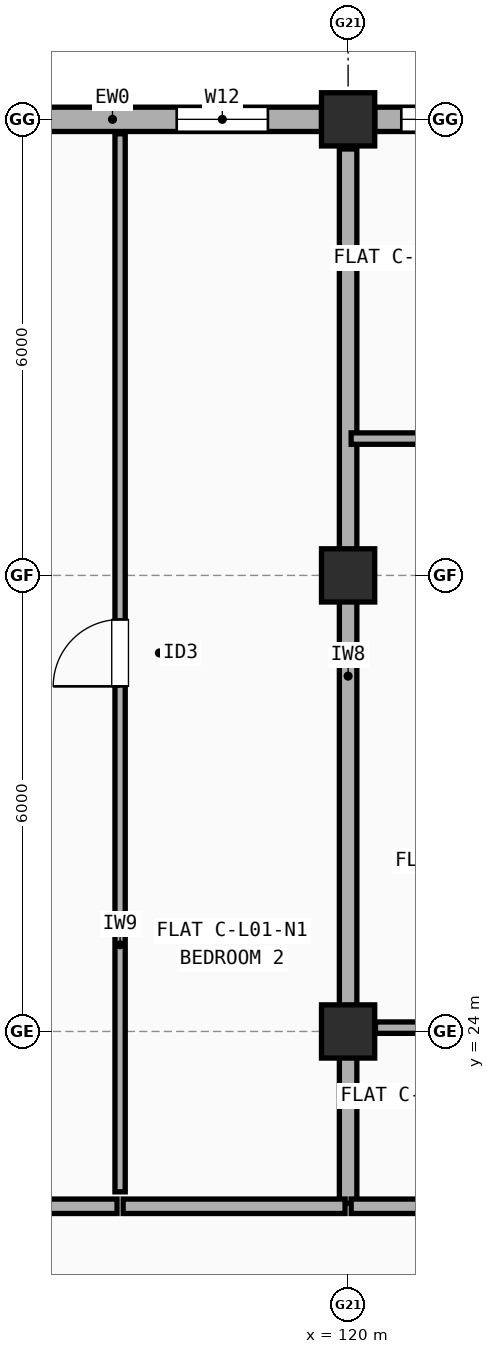
"""IFC4 building model, lengths in metres.
Left out: names, types, materials, properties, quantities, classifications, styles, units other than length and angle.
Written with IfcOpenShell. Run it as: python <this file> out.ifc"""

import sys

from ifc_helpers import new_model, si_unit, direction, frame, frame_2d, origin, origin_2d, place, context, subcontext, project, spatial, rectangle, extrude, element, fill, save


model = new_model("IFC4")
c1 = context("Model", 3, precision=1e-05, world=origin(), true_north=direction((0.0, 1.0)))
c2 = subcontext(c1, "Body", "Model", "MODEL_VIEW")
j1 = project(units=[si_unit("LENGTHUNIT", "METRE"), si_unit("PLANEANGLEUNIT", "RADIAN")], contexts=[c1])
p1 = place(None, origin())
s1 = spatial("IfcSite", under=j1, at=p1, CompositionType="ELEMENT")
p2 = place(p1, origin())
s2 = spatial("IfcBuilding", under=s1, at=p2, CompositionType="ELEMENT")
p3 = place(p2, frame((0.0, 0.0, 4.5)))
s3 = spatial("IfcBuildingStorey", under=s2, at=p3, CompositionType="ELEMENT", Elevation=4.5)
for number, where, z_axis, x_axis in (
    (1, (120.0, 24.0, 0.0), (0.0, 0.0, 1.0), (1.0, 0.0, 0.0)),
    (2, (120.0, 30.0, 0.0), (0.0, 0.0, 1.0), (1.0, 0.0, 0.0)),
    (3, (120.0, 36.0, 0.0), (0.0, 0.0, 1.0), (1.0, 0.0, 0.0)),
):
    element("IfcColumn", number, at=place(p3, frame(where, z_axis=z_axis, x_axis=x_axis)), inside=s3, PredefinedType="COLUMN", context=c2, shape_type="SweptSolid", body=[
        extrude(rectangle(XDim=0.7, YDim=0.7, at=origin_2d()), origin(), (0.0, 0.0, 1.0), 2.945),
    ])
p4 = place(p3, frame((125.65, 36.0, 0.0), z_axis=(0.0, 0.0, 1.0), x_axis=(-1.0, 0.0, 0.0)))
e4 = element("IfcWall", 4, at=p4, inside=s3, PredefinedType="STANDARD", context=c2, shape_type="SweptSolid", body=[
    extrude(rectangle(XDim=5.3, YDim=0.32, at=frame_2d((2.65, 0.0))), origin(), (0.0, 0.0, 1.0), 2.427),
])
p5 = place(p4, frame((1.54, 0.0, 0.9)))
e5 = element("IfcOpeningElement", 5, at=p5, cuts=e4, PredefinedType="OPENING", context=c2, shape_type="SweptSolid", body=[
    extrude(rectangle(XDim=0.95, YDim=1.35, at=frame_2d((0.475, 0.675))), frame((0.0, 0.17, 0.0), z_axis=(0.0, -1.0, 0.0), x_axis=(1.0, 0.0, 0.0)), (0.0, 0.0, 1.0), 0.34),
])
p6 = place(p4, frame((4.0, 0.0, 0.9)))
e6 = element("IfcOpeningElement", 6, at=p6, cuts=e4, PredefinedType="OPENING", context=c2, shape_type="SweptSolid", body=[
    extrude(rectangle(XDim=0.95, YDim=1.35, at=frame_2d((0.475, 0.675))), frame((0.0, 0.17, 0.0), z_axis=(0.0, -1.0, 0.0), x_axis=(1.0, 0.0, 0.0)), (0.0, 0.0, 1.0), 0.34),
])
p7 = place(p3, frame((119.65, 36.0, 0.0), z_axis=(0.0, 0.0, 1.0), x_axis=(-1.0, 0.0, 0.0)))
e7 = element("IfcWall", 7, at=p7, inside=s3, PredefinedType="STANDARD", context=c2, shape_type="SweptSolid", body=[
    extrude(rectangle(XDim=5.3, YDim=0.32, at=frame_2d((2.65, 0.0))), origin(), (0.0, 0.0, 1.0), 2.427),
])
p8 = place(p7, frame((0.705, 0.0, 0.9)))
e8 = element("IfcOpeningElement", 8, at=p8, cuts=e7, PredefinedType="OPENING", context=c2, shape_type="SweptSolid", body=[
    extrude(rectangle(XDim=1.2, YDim=1.35, at=frame_2d((0.6, 0.675))), frame((0.0, 0.17, 0.0), z_axis=(0.0, -1.0, 0.0), x_axis=(1.0, 0.0, 0.0)), (0.0, 0.0, 1.0), 0.34),
])
p9 = place(p7, frame((3.595, 0.0, 0.9)))
e9 = element("IfcOpeningElement", 9, at=p9, cuts=e7, PredefinedType="OPENING", context=c2, shape_type="SweptSolid", body=[
    extrude(rectangle(XDim=0.8, YDim=1.2, at=frame_2d((0.4, 0.6))), frame((0.0, 0.17, 0.0), z_axis=(0.0, -1.0, 0.0), x_axis=(1.0, 0.0, 0.0)), (0.0, 0.0, 1.0), 0.34),
])
p10 = place(p3, frame((120.0, 21.74, 0.0), z_axis=(0.0, 0.0, 1.0), x_axis=(0.0, 1.0, 0.0)))
e10 = element("IfcWall", 10, at=p10, inside=s3, PredefinedType="SOLIDWALL", context=c2, shape_type="SweptSolid", body=[
    extrude(rectangle(XDim=13.87, YDim=0.23, at=frame_2d((6.935, 0.0))), origin(), (0.0, 0.0, 1.0), 2.327),
])
p11 = place(p3, frame((106.54, 21.7, 0.0), z_axis=(0.0, 0.0, 1.0), x_axis=(1.0, 0.0, 0.0)))
e11 = element("IfcWall", 11, at=p11, inside=s3, PredefinedType="SOLIDWALL", context=c2, shape_type="SweptSolid", body=[
    extrude(rectangle(XDim=10.42, YDim=0.19, at=frame_2d((5.21, 0.0))), origin(), (0.0, 0.0, 1.0), 2.508),
])
p12 = place(p11, frame((4.71, 0.0, 0.0)))
e12 = element("IfcOpeningElement", 12, at=p12, cuts=e11, PredefinedType="OPENING", context=c2, shape_type="SweptSolid", body=[
    extrude(rectangle(XDim=1.0, YDim=2.15, at=frame_2d((0.5, 1.075))), frame((0.0, 0.105, 0.0), z_axis=(0.0, -1.0, 0.0), x_axis=(1.0, 0.0, 0.0)), (0.0, 0.0, 1.0), 0.21),
])
p13 = place(p3, frame((117.04, 21.7, 0.0), z_axis=(0.0, 0.0, 1.0), x_axis=(1.0, 0.0, 0.0)))
e13 = element("IfcWall", 13, at=p13, inside=s3, PredefinedType="SOLIDWALL", context=c2, shape_type="SweptSolid", body=[
    extrude(rectangle(XDim=2.92, YDim=0.19, at=frame_2d((1.46, 0.0))), origin(), (0.0, 0.0, 1.0), 2.945),
])
p14 = place(p3, frame((117.0, 21.89, 0.0), z_axis=(0.0, 0.0, 1.0), x_axis=(0.0, 1.0, 0.0)))
e14 = element("IfcWall", 14, at=p14, inside=s3, PredefinedType="PARTITIONING", context=c2, shape_type="SweptSolid", body=[
    extrude(rectangle(XDim=13.92, YDim=0.135, at=frame_2d((6.96, 0.0))), origin(), (0.0, 0.0, 1.0), 2.377),
])
p15 = place(p14, frame((6.65, 0.0, 0.0)))
e15 = element("IfcOpeningElement", 15, at=p15, cuts=e14, PredefinedType="OPENING", context=c2, shape_type="SweptSolid", body=[
    extrude(rectangle(XDim=0.88, YDim=2.1, at=frame_2d((0.44, 1.05))), frame((0.0, 0.077, 0.0), z_axis=(0.0, -1.0, 0.0), x_axis=(1.0, 0.0, 0.0)), (0.0, 0.0, 1.0), 0.155),
])
p16 = place(p3, frame((120.04, 21.7, 0.0), z_axis=(0.0, 0.0, 1.0), x_axis=(1.0, 0.0, 0.0)))
e16 = element("IfcWall", 16, at=p16, inside=s3, PredefinedType="SOLIDWALL", context=c2, shape_type="SweptSolid", body=[
    extrude(rectangle(XDim=4.42, YDim=0.19, at=frame_2d((2.21, 0.0))), origin(), (0.0, 0.0, 1.0), 2.945),
])
p17 = place(p3, frame((120.04, 31.8, 0.0), z_axis=(0.0, 0.0, 1.0), x_axis=(1.0, 0.0, 0.0)))
e17 = element("IfcWall", 17, at=p17, inside=s3, PredefinedType="PARTITIONING", context=c2, shape_type="SweptSolid", body=[
    extrude(rectangle(XDim=4.42, YDim=0.15, at=frame_2d((2.21, 0.0))), origin(), (0.0, 0.0, 1.0), 2.327),
])
p18 = place(p3, frame((120.36, 24.05, 0.0), z_axis=(0.0, 0.0, 1.0), x_axis=(1.0, 0.0, 0.0)))
e18 = element("IfcWall", 18, at=p18, inside=s3, PredefinedType="PARTITIONING", context=c2, shape_type="SweptSolid", body=[
    extrude(rectangle(XDim=4.1, YDim=0.15, at=frame_2d((2.05, 0.0))), origin(), (0.0, 0.0, 1.0), 2.377),
])
p19 = place(p6, origin())
e19 = element("IfcWindow", 19, at=p19, inside=s3, PartitioningType="SINGLE_PANEL", PredefinedType="WINDOW", context=c2, shape_type="SweptSolid", body=[
    extrude(rectangle(XDim=0.95, YDim=1.35, at=frame_2d((0.475, 0.675))), frame((0.0, 0.03, 0.0), z_axis=(0.0, -1.0, 0.0), x_axis=(1.0, 0.0, 0.0)), (0.0, 0.0, 1.0), 0.06),
])
fill(e6, e19)
p20 = place(p8, origin())
e20 = element("IfcWindow", 20, at=p20, inside=s3, PartitioningType="SINGLE_PANEL", PredefinedType="WINDOW", context=c2, shape_type="SweptSolid", body=[
    extrude(rectangle(XDim=1.2, YDim=1.35, at=frame_2d((0.6, 0.675))), frame((0.0, 0.03, 0.0), z_axis=(0.0, -1.0, 0.0), x_axis=(1.0, 0.0, 0.0)), (0.0, 0.0, 1.0), 0.06),
])
fill(e8, e20)
p21 = place(p15, origin())
e21 = element("IfcDoor", 21, at=p21, inside=s3, OperationType="SINGLE_SWING_LEFT", PredefinedType="DOOR", context=c2, shape_type="SweptSolid", body=[
    extrude(rectangle(XDim=0.88, YDim=2.1, at=frame_2d((0.44, 1.05))), frame((0.0, 0.025, 0.0), z_axis=(0.0, -1.0, 0.0), x_axis=(1.0, 0.0, 0.0)), (0.0, 0.0, 1.0), 0.05),
])
fill(e15, e21)
save(model, sys.argv[1])
